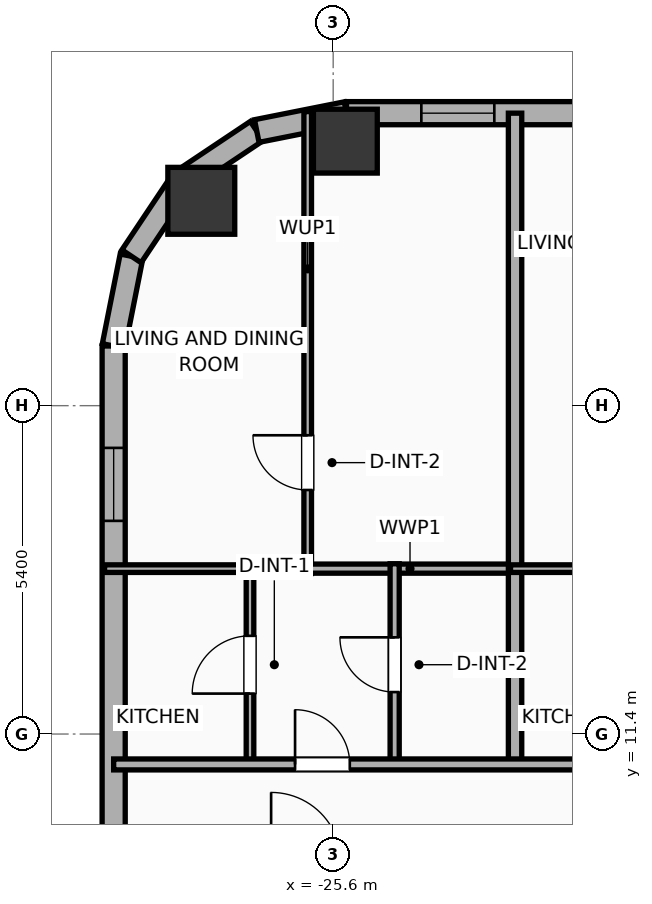
"""IFC4 building model, lengths in metres.
Left out: names, types, materials, properties, quantities, classifications, styles, units other than length and angle.
Written with IfcOpenShell. Run it as: python <this file> out.ifc"""

import sys

from ifc_helpers import new_model, si_unit, direction, frame, frame_2d, origin, origin_2d, place, context, subcontext, project, spatial, rectangle, hollow_rectangle, hollow_circle, extrude, element, fill, save


model = new_model("IFC4")
c1 = context("Model", 3, precision=1e-05, world=origin(), true_north=direction((0.0, 1.0)))
c2 = subcontext(c1, "Body", "Model", "MODEL_VIEW")
j1 = project(units=[si_unit("LENGTHUNIT", "METRE"), si_unit("PLANEANGLEUNIT", "RADIAN")], contexts=[c1])
p1 = place(None, origin())
s1 = spatial("IfcSite", under=j1, at=p1, CompositionType="ELEMENT")
p2 = place(p1, origin())
s2 = spatial("IfcBuilding", under=s1, at=p2, CompositionType="ELEMENT")
p3 = place(p2, frame((0.0, 0.0, 89.7)))
s3 = spatial("IfcBuildingStorey", under=s2, at=p3, CompositionType="ELEMENT", Elevation=89.7)
p4 = place(p3, frame((-25.4, 21.15, 0.0), z_axis=(0.0, 0.0, 1.0), x_axis=(1.0, 0.0, 0.0)))
e1 = element("IfcColumn", 1, at=p4, inside=s3, PredefinedType="COLUMN", context=c2, shape_type="SweptSolid", body=[
    extrude(hollow_rectangle(XDim=1.05, YDim=1.05, WallThickness=0.036, at=origin_2d()), origin(), (0.0, 0.0, 1.0), 3.9),
])
p5 = place(p3, frame((-27.769, 20.169, 0.0), z_axis=(0.0, 0.0, 1.0), x_axis=(1.0, 0.0, 0.0)))
e2 = element("IfcColumn", 2, at=p5, inside=s3, PredefinedType="COLUMN", context=c2, shape_type="SweptSolid", body=[
    extrude(hollow_circle(Radius=0.55, WallThickness=0.036, at=origin_2d()), origin(), (0.0, 0.0, 1.0), 3.9),
])
p6 = place(p3, frame((-29.21, -16.581, 0.0), z_axis=(0.0, 0.0, 1.0), x_axis=(0.0, 1.0, 0.0)))
e3 = element("IfcWall", 3, at=p6, inside=s3, PredefinedType="ELEMENTEDWALL", context=c2, shape_type="SweptSolid", body=[
    extrude(rectangle(XDim=34.363, YDim=0.38, at=frame_2d((17.181, 0.0))), origin(), (0.0, 0.0, 1.0), 2.54),
])
p7 = place(p6, frame((31.487, 0.0, 0.75)))
e4 = element("IfcOpeningElement", 4, at=p7, cuts=e3, PredefinedType="OPENING", context=c2, shape_type="SweptSolid", body=[
    extrude(rectangle(XDim=1.2, YDim=1.63, at=frame_2d((0.6, 0.815))), frame((0.0, 0.2, 0.0), z_axis=(0.0, -1.0, 0.0), x_axis=(1.0, 0.0, 0.0)), (0.0, 0.0, 1.0), 0.4),
])
p8 = place(p6, frame((20.726, 0.0, 0.75)))
e5 = element("IfcOpeningElement", 5, at=p8, cuts=e3, PredefinedType="OPENING", context=c2, shape_type="SweptSolid", body=[
    extrude(rectangle(XDim=1.2, YDim=1.63, at=frame_2d((0.6, 0.815))), frame((0.0, 0.2, 0.0), z_axis=(0.0, -1.0, 0.0), x_axis=(1.0, 0.0, 0.0)), (0.0, 0.0, 1.0), 0.4),
])
p9 = place(p6, frame((11.376, 0.0, 0.75)))
e6 = element("IfcOpeningElement", 6, at=p9, cuts=e3, PredefinedType="OPENING", context=c2, shape_type="SweptSolid", body=[
    extrude(rectangle(XDim=1.2, YDim=1.63, at=frame_2d((0.6, 0.815))), frame((0.0, 0.2, 0.0), z_axis=(0.0, -1.0, 0.0), x_axis=(1.0, 0.0, 0.0)), (0.0, 0.0, 1.0), 0.4),
])
p10 = place(p3, frame((-29.21, 17.781, 0.0), z_axis=(0.0, 0.0, 1.0), x_axis=(0.195086038585, 0.980786132421, 0.0)))
e7 = element("IfcWall", 7, at=p10, inside=s3, PredefinedType="ELEMENTEDWALL", context=c2, shape_type="SweptSolid", body=[
    extrude(rectangle(XDim=1.504, YDim=0.38, at=frame_2d((0.752, 0.0))), origin(), (0.0, 0.0, 1.0), 3.65),
])
p11 = place(p3, frame((-28.917, 19.257, 0.0), z_axis=(0.0, 0.0, 1.0), x_axis=(0.555610286119, 0.831442848281, 0.0)))
e8 = element("IfcWall", 8, at=p11, inside=s3, PredefinedType="ELEMENTEDWALL", context=c2, shape_type="SweptSolid", body=[
    extrude(rectangle(XDim=1.485, YDim=0.38, at=frame_2d((0.743, 0.0))), origin(), (0.0, 0.0, 1.0), 3.65),
])
p12 = place(p3, frame((-28.091, 20.491, 0.0), z_axis=(0.0, 0.0, 1.0), x_axis=(0.831468045563, 0.555572577804, 0.0)))
e9 = element("IfcWall", 9, at=p12, inside=s3, PredefinedType="ELEMENTEDWALL", context=c2, shape_type="SweptSolid", body=[
    extrude(rectangle(XDim=1.485, YDim=0.38, at=frame_2d((0.742, 0.0))), origin(), (0.0, 0.0, 1.0), 2.54),
])
p13 = place(p3, frame((-26.857, 21.316, 0.0), z_axis=(0.0, 0.0, 1.0), x_axis=(0.980755066645, 0.195242155415, 0.0)))
e10 = element("IfcWall", 10, at=p13, inside=s3, PredefinedType="ELEMENTEDWALL", context=c2, shape_type="SweptSolid", body=[
    extrude(rectangle(XDim=1.504, YDim=0.38, at=frame_2d((0.752, 0.0))), origin(), (0.0, 0.0, 1.0), 2.54),
])
p14 = place(p3, frame((-25.381, 21.61, 0.0), z_axis=(0.0, 0.0, 1.0), x_axis=(1.0, 0.0, 0.0)))
e11 = element("IfcWall", 11, at=p14, inside=s3, PredefinedType="ELEMENTEDWALL", context=c2, shape_type="SweptSolid", body=[
    extrude(rectangle(XDim=54.763, YDim=0.38, at=frame_2d((27.381, 0.0))), origin(), (0.0, 0.0, 1.0), 2.54),
])
p15 = place(p14, frame((6.495, 0.0, 0.75)))
e12 = element("IfcOpeningElement", 12, at=p15, cuts=e11, PredefinedType="OPENING", context=c2, shape_type="SweptSolid", body=[
    extrude(rectangle(XDim=2.4, YDim=1.63, at=frame_2d((1.2, 0.815))), frame((0.0, 0.2, 0.0), z_axis=(0.0, -1.0, 0.0), x_axis=(1.0, 0.0, 0.0)), (0.0, 0.0, 1.0), 0.4),
])
p16 = place(p14, frame((48.367, 0.0, 0.75)))
e13 = element("IfcOpeningElement", 13, at=p16, cuts=e11, PredefinedType="OPENING", context=c2, shape_type="SweptSolid", body=[
    extrude(rectangle(XDim=2.4, YDim=1.63, at=frame_2d((1.2, 0.815))), frame((0.0, 0.2, 0.0), z_axis=(0.0, -1.0, 0.0), x_axis=(1.0, 0.0, 0.0)), (0.0, 0.0, 1.0), 0.4),
])
p17 = place(p14, frame((1.231, 0.0, 0.75)))
e14 = element("IfcOpeningElement", 14, at=p17, cuts=e11, PredefinedType="OPENING", context=c2, shape_type="SweptSolid", body=[
    extrude(rectangle(XDim=1.2, YDim=1.63, at=frame_2d((0.6, 0.815))), frame((0.0, 0.2, 0.0), z_axis=(0.0, -1.0, 0.0), x_axis=(1.0, 0.0, 0.0)), (0.0, 0.0, 1.0), 0.4),
])
p18 = place(p14, frame((3.772, 0.0, 0.75)))
e15 = element("IfcOpeningElement", 15, at=p18, cuts=e11, PredefinedType="OPENING", context=c2, shape_type="SweptSolid", body=[
    extrude(rectangle(XDim=1.2, YDim=1.63, at=frame_2d((0.6, 0.815))), frame((0.0, 0.2, 0.0), z_axis=(0.0, -1.0, 0.0), x_axis=(1.0, 0.0, 0.0)), (0.0, 0.0, 1.0), 0.4),
])
p19 = place(p14, frame((12.031, 0.0, 0.75)))
e16 = element("IfcOpeningElement", 16, at=p19, cuts=e11, PredefinedType="OPENING", context=c2, shape_type="SweptSolid", body=[
    extrude(rectangle(XDim=1.2, YDim=1.63, at=frame_2d((0.6, 0.815))), frame((0.0, 0.2, 0.0), z_axis=(0.0, -1.0, 0.0), x_axis=(1.0, 0.0, 0.0)), (0.0, 0.0, 1.0), 0.4),
])
p20 = place(p14, frame((19.805, 0.0, 0.75)))
e17 = element("IfcOpeningElement", 17, at=p20, cuts=e11, PredefinedType="OPENING", context=c2, shape_type="SweptSolid", body=[
    extrude(rectangle(XDim=1.2, YDim=1.63, at=frame_2d((0.6, 0.815))), frame((0.0, 0.2, 0.0), z_axis=(0.0, -1.0, 0.0), x_axis=(1.0, 0.0, 0.0)), (0.0, 0.0, 1.0), 0.4),
])
p21 = place(p14, frame((16.555, 0.0, 0.75)))
e18 = element("IfcOpeningElement", 18, at=p21, cuts=e11, PredefinedType="OPENING", context=c2, shape_type="SweptSolid", body=[
    extrude(rectangle(XDim=1.2, YDim=1.63, at=frame_2d((0.6, 0.815))), frame((0.0, 0.2, 0.0), z_axis=(0.0, -1.0, 0.0), x_axis=(1.0, 0.0, 0.0)), (0.0, 0.0, 1.0), 0.4),
])
p22 = place(p14, frame((23.866, 0.0, 0.75)))
e19 = element("IfcOpeningElement", 19, at=p22, cuts=e11, PredefinedType="OPENING", context=c2, shape_type="SweptSolid", body=[
    extrude(rectangle(XDim=1.2, YDim=1.63, at=frame_2d((0.6, 0.815))), frame((0.0, 0.2, 0.0), z_axis=(0.0, -1.0, 0.0), x_axis=(1.0, 0.0, 0.0)), (0.0, 0.0, 1.0), 0.4),
])
p23 = place(p14, frame((27.116, 0.0, 0.75)))
e20 = element("IfcOpeningElement", 20, at=p23, cuts=e11, PredefinedType="OPENING", context=c2, shape_type="SweptSolid", body=[
    extrude(rectangle(XDim=1.2, YDim=1.63, at=frame_2d((0.6, 0.815))), frame((0.0, 0.2, 0.0), z_axis=(0.0, -1.0, 0.0), x_axis=(1.0, 0.0, 0.0)), (0.0, 0.0, 1.0), 0.4),
])
p24 = place(p14, frame((30.931, 0.0, 0.75)))
e21 = element("IfcOpeningElement", 21, at=p24, cuts=e11, PredefinedType="OPENING", context=c2, shape_type="SweptSolid", body=[
    extrude(rectangle(XDim=1.2, YDim=1.63, at=frame_2d((0.6, 0.815))), frame((0.0, 0.2, 0.0), z_axis=(0.0, -1.0, 0.0), x_axis=(1.0, 0.0, 0.0)), (0.0, 0.0, 1.0), 0.4),
])
p25 = place(p14, frame((36.733, 0.0, 0.75)))
e22 = element("IfcOpeningElement", 22, at=p25, cuts=e11, PredefinedType="OPENING", context=c2, shape_type="SweptSolid", body=[
    extrude(rectangle(XDim=1.2, YDim=1.63, at=frame_2d((0.6, 0.815))), frame((0.0, 0.2, 0.0), z_axis=(0.0, -1.0, 0.0), x_axis=(1.0, 0.0, 0.0)), (0.0, 0.0, 1.0), 0.4),
])
p26 = place(p14, frame((39.858, 0.0, 0.75)))
e23 = element("IfcOpeningElement", 23, at=p26, cuts=e11, PredefinedType="OPENING", context=c2, shape_type="SweptSolid", body=[
    extrude(rectangle(XDim=1.2, YDim=1.63, at=frame_2d((0.6, 0.815))), frame((0.0, 0.2, 0.0), z_axis=(0.0, -1.0, 0.0), x_axis=(1.0, 0.0, 0.0)), (0.0, 0.0, 1.0), 0.4),
])
p27 = place(p14, frame((44.636, 0.0, 0.75)))
e24 = element("IfcOpeningElement", 24, at=p27, cuts=e11, PredefinedType="OPENING", context=c2, shape_type="SweptSolid", body=[
    extrude(rectangle(XDim=1.2, YDim=1.63, at=frame_2d((0.6, 0.815))), frame((0.0, 0.2, 0.0), z_axis=(0.0, -1.0, 0.0), x_axis=(1.0, 0.0, 0.0)), (0.0, 0.0, 1.0), 0.4),
])
p28 = place(p14, frame((51.809, 0.0, 0.75)))
e25 = element("IfcOpeningElement", 25, at=p28, cuts=e11, PredefinedType="OPENING", context=c2, shape_type="SweptSolid", body=[
    extrude(rectangle(XDim=1.2, YDim=1.63, at=frame_2d((0.6, 0.815))), frame((0.0, 0.2, 0.0), z_axis=(0.0, -1.0, 0.0), x_axis=(1.0, 0.0, 0.0)), (0.0, 0.0, 1.0), 0.4),
])
p29 = place(p3, frame((-26.019, 14.04, 0.0), z_axis=(0.0, 0.0, 1.0), x_axis=(0.0, 1.0, 0.0)))
e26 = element("IfcWall", 26, at=p29, inside=s3, PredefinedType="PARTITIONING", context=c2, shape_type="SweptSolid", body=[
    extrude(rectangle(XDim=7.596, YDim=0.125, at=frame_2d((3.798, 0.0))), origin(), (0.0, 0.0, 1.0), 3.65),
])
p30 = place(p29, frame((1.373, 0.0, 0.0)))
e27 = element("IfcOpeningElement", 27, at=p30, cuts=e26, PredefinedType="OPENING", context=c2, shape_type="SweptSolid", body=[
    extrude(rectangle(XDim=0.9, YDim=2.05, at=frame_2d((0.45, 1.025))), frame((0.0, 0.073, 0.0), z_axis=(0.0, -1.0, 0.0), x_axis=(1.0, 0.0, 0.0)), (0.0, 0.0, 1.0), 0.145),
])
p31 = place(p3, frame((-26.139, 14.12, 0.0), z_axis=(0.0, 0.0, 1.0), x_axis=(1.0, 0.0, 0.0)))
e28 = element("IfcWall", 28, at=p31, inside=s3, PredefinedType="PLUMBINGWALL", context=c2, shape_type="SweptSolid", body=[
    extrude(rectangle(XDim=3.605, YDim=0.15, at=frame_2d((1.802, 0.0))), origin(), (0.0, 0.0, 1.0), 3.65),
])
p32 = place(p3, frame((-26.968, 10.88, 0.0), z_axis=(0.0, 0.0, 1.0), x_axis=(0.0, 1.0, 0.0)))
e29 = element("IfcWall", 29, at=p32, inside=s3, PredefinedType="PARTITIONING", context=c2, shape_type="SweptSolid", body=[
    extrude(rectangle(XDim=3.32, YDim=0.125, at=frame_2d((1.66, 0.0))), origin(), (0.0, 0.0, 1.0), 3.65),
])
p33 = place(p32, frame((1.185, 0.0, 0.0)))
e30 = element("IfcOpeningElement", 30, at=p33, cuts=e29, PredefinedType="OPENING", context=c2, shape_type="SweptSolid", body=[
    extrude(rectangle(XDim=0.95, YDim=2.05, at=frame_2d((0.475, 1.025))), frame((0.0, 0.073, 0.0), z_axis=(0.0, -1.0, 0.0), x_axis=(1.0, 0.0, 0.0)), (0.0, 0.0, 1.0), 0.145),
])
p34 = place(p3, frame((-29.36, 14.12, 0.0), z_axis=(0.0, 0.0, 1.0), x_axis=(1.0, 0.0, 0.0)))
e31 = element("IfcWall", 31, at=p34, inside=s3, PredefinedType="PARTITIONING", context=c2, shape_type="SweptSolid", body=[
    extrude(rectangle(XDim=2.512, YDim=0.125, at=frame_2d((1.256, 0.0))), origin(), (0.0, 0.0, 1.0), 3.65),
])
p35 = place(p3, frame((-24.589, 10.88, 0.0), z_axis=(0.0, 0.0, 1.0), x_axis=(0.0, 1.0, 0.0)))
e32 = element("IfcWall", 32, at=p35, inside=s3, PredefinedType="PLUMBINGWALL", context=c2, shape_type="SweptSolid", body=[
    extrude(rectangle(XDim=3.32, YDim=0.15, at=frame_2d((1.66, 0.0))), origin(), (0.0, 0.0, 1.0), 3.65),
])
p36 = place(p35, frame((1.21, 0.0, 0.0)))
e33 = element("IfcOpeningElement", 33, at=p36, cuts=e32, PredefinedType="OPENING", context=c2, shape_type="SweptSolid", body=[
    extrude(rectangle(XDim=0.9, YDim=2.05, at=frame_2d((0.45, 1.025))), frame((0.0, 0.085, 0.0), z_axis=(0.0, -1.0, 0.0), x_axis=(1.0, 0.0, 0.0)), (0.0, 0.0, 1.0), 0.17),
])
p37 = place(p3, frame((-22.609, 10.82, 0.0), z_axis=(0.0, 0.0, 1.0), x_axis=(0.0, 1.0, 0.0)))
e34 = element("IfcWall", 34, at=p37, inside=s3, PredefinedType="PARTITIONING", context=c2, shape_type="SweptSolid", body=[
    extrude(rectangle(XDim=10.79, YDim=0.22, at=frame_2d((5.395, 0.0))), origin(), (0.0, 0.0, 1.0), 3.65),
])
p38 = place(p3, frame((-22.684, 14.12, 0.0), z_axis=(0.0, 0.0, 1.0), x_axis=(1.0, 0.0, 0.0)))
e35 = element("IfcWall", 35, at=p38, inside=s3, PredefinedType="PARTITIONING", context=c2, shape_type="SweptSolid", body=[
    extrude(rectangle(XDim=2.505, YDim=0.125, at=frame_2d((1.252, 0.0))), origin(), (0.0, 0.0, 1.0), 3.65),
])
p39 = place(p3, frame((-29.21, 10.9, 0.0), z_axis=(0.0, 0.0, 1.0), x_axis=(1.0, 0.0, 0.0)))
e36 = element("IfcWall", 36, at=p39, inside=s3, PredefinedType="PARTITIONING", context=c2, shape_type="SweptSolid", body=[
    extrude(rectangle(XDim=62.42, YDim=0.18, at=frame_2d((31.21, 0.0))), origin(), (0.0, 0.0, 1.0), 3.65),
])
p40 = place(p39, frame((2.983, 0.0, 0.0)))
e37 = element("IfcOpeningElement", 37, at=p40, cuts=e36, PredefinedType="OPENING", context=c2, shape_type="SweptSolid", body=[
    extrude(rectangle(XDim=0.9, YDim=2.05, at=frame_2d((0.45, 1.025))), frame((0.0, 0.1, 0.0), z_axis=(0.0, -1.0, 0.0), x_axis=(1.0, 0.0, 0.0)), (0.0, 0.0, 1.0), 0.2),
])
p41 = place(p39, frame((9.618, 0.0, 0.0)))
e38 = element("IfcOpeningElement", 38, at=p41, cuts=e36, PredefinedType="OPENING", context=c2, shape_type="SweptSolid", body=[
    extrude(rectangle(XDim=0.9, YDim=2.05, at=frame_2d((0.45, 1.025))), frame((0.0, 0.1, 0.0), z_axis=(0.0, -1.0, 0.0), x_axis=(1.0, 0.0, 0.0)), (0.0, 0.0, 1.0), 0.2),
])
p42 = place(p39, frame((16.135, 0.0, 0.0)))
e39 = element("IfcOpeningElement", 39, at=p42, cuts=e36, PredefinedType="OPENING", context=c2, shape_type="SweptSolid", body=[
    extrude(rectangle(XDim=0.9, YDim=2.05, at=frame_2d((0.45, 1.025))), frame((0.0, 0.1, 0.0), z_axis=(0.0, -1.0, 0.0), x_axis=(1.0, 0.0, 0.0)), (0.0, 0.0, 1.0), 0.2),
])
p43 = place(p39, frame((23.632, 0.0, 0.0)))
e40 = element("IfcOpeningElement", 40, at=p43, cuts=e36, PredefinedType="OPENING", context=c2, shape_type="SweptSolid", body=[
    extrude(rectangle(XDim=1.15, YDim=2.05, at=frame_2d((0.575, 1.025))), frame((0.0, 0.1, 0.0), z_axis=(0.0, -1.0, 0.0), x_axis=(1.0, 0.0, 0.0)), (0.0, 0.0, 1.0), 0.2),
])
p44 = place(p39, frame((27.751, 0.0, 0.0)))
e41 = element("IfcOpeningElement", 41, at=p44, cuts=e36, PredefinedType="OPENING", context=c2, shape_type="SweptSolid", body=[
    extrude(rectangle(XDim=1.15, YDim=2.05, at=frame_2d((0.575, 1.025))), frame((0.0, 0.1, 0.0), z_axis=(0.0, -1.0, 0.0), x_axis=(1.0, 0.0, 0.0)), (0.0, 0.0, 1.0), 0.2),
])
p45 = place(p39, frame((35.635, 0.0, 0.0)))
e42 = element("IfcOpeningElement", 42, at=p45, cuts=e36, PredefinedType="OPENING", context=c2, shape_type="SweptSolid", body=[
    extrude(rectangle(XDim=0.9, YDim=2.05, at=frame_2d((0.45, 1.025))), frame((0.0, 0.1, 0.0), z_axis=(0.0, -1.0, 0.0), x_axis=(1.0, 0.0, 0.0)), (0.0, 0.0, 1.0), 0.2),
])
p46 = place(p39, frame((40.616, 0.0, 0.0)))
e43 = element("IfcOpeningElement", 43, at=p46, cuts=e36, PredefinedType="OPENING", context=c2, shape_type="SweptSolid", body=[
    extrude(rectangle(XDim=1.15, YDim=2.05, at=frame_2d((0.575, 1.025))), frame((0.0, 0.1, 0.0), z_axis=(0.0, -1.0, 0.0), x_axis=(1.0, 0.0, 0.0)), (0.0, 0.0, 1.0), 0.2),
])
p47 = place(p39, frame((48.256, 0.0, 0.0)))
e44 = element("IfcOpeningElement", 44, at=p47, cuts=e36, PredefinedType="OPENING", context=c2, shape_type="SweptSolid", body=[
    extrude(rectangle(XDim=0.9, YDim=2.05, at=frame_2d((0.45, 1.025))), frame((0.0, 0.1, 0.0), z_axis=(0.0, -1.0, 0.0), x_axis=(1.0, 0.0, 0.0)), (0.0, 0.0, 1.0), 0.2),
])
p48 = place(p39, frame((57.032, 0.0, 0.0)))
e45 = element("IfcOpeningElement", 45, at=p48, cuts=e36, PredefinedType="OPENING", context=c2, shape_type="SweptSolid", body=[
    extrude(rectangle(XDim=1.15, YDim=2.05, at=frame_2d((0.575, 1.025))), frame((0.0, 0.1, 0.0), z_axis=(0.0, -1.0, 0.0), x_axis=(1.0, 0.0, 0.0)), (0.0, 0.0, 1.0), 0.2),
])
p49 = place(p7, origin())
e46 = element("IfcWindow", 46, at=p49, inside=s3, PartitioningType="SINGLE_PANEL", PredefinedType="WINDOW", context=c2, shape_type="SweptSolid", body=[
    extrude(rectangle(XDim=1.2, YDim=1.63, at=frame_2d((0.6, 0.815))), frame((0.0, 0.03, 0.0), z_axis=(0.0, -1.0, 0.0), x_axis=(1.0, 0.0, 0.0)), (0.0, 0.0, 1.0), 0.06),
])
fill(e4, e46)
p50 = place(p17, origin())
e47 = element("IfcWindow", 47, at=p50, inside=s3, PartitioningType="SINGLE_PANEL", PredefinedType="WINDOW", context=c2, shape_type="SweptSolid", body=[
    extrude(rectangle(XDim=1.2, YDim=1.63, at=frame_2d((0.6, 0.815))), frame((0.0, 0.03, 0.0), z_axis=(0.0, -1.0, 0.0), x_axis=(1.0, 0.0, 0.0)), (0.0, 0.0, 1.0), 0.06),
])
fill(e14, e47)
p51 = place(p30, origin())
e48 = element("IfcDoor", 48, at=p51, inside=s3, OperationType="SINGLE_SWING_RIGHT", PredefinedType="DOOR", context=c2, shape_type="SweptSolid", body=[
    extrude(rectangle(XDim=0.9, YDim=2.05, at=frame_2d((0.45, 1.025))), frame((0.0, 0.025, 0.0), z_axis=(0.0, -1.0, 0.0), x_axis=(1.0, 0.0, 0.0)), (0.0, 0.0, 1.0), 0.05),
])
fill(e27, e48)
p52 = place(p33, origin())
e49 = element("IfcDoor", 49, at=p52, inside=s3, OperationType="SINGLE_SWING_LEFT", PredefinedType="DOOR", context=c2, shape_type="SweptSolid", body=[
    extrude(rectangle(XDim=0.95, YDim=2.05, at=frame_2d((0.475, 1.025))), frame((0.0, 0.025, 0.0), z_axis=(0.0, -1.0, 0.0), x_axis=(1.0, 0.0, 0.0)), (0.0, 0.0, 1.0), 0.05),
])
fill(e30, e49)
p53 = place(p36, origin())
e50 = element("IfcDoor", 50, at=p53, inside=s3, OperationType="SINGLE_SWING_RIGHT", PredefinedType="DOOR", context=c2, shape_type="SweptSolid", body=[
    extrude(rectangle(XDim=0.9, YDim=2.05, at=frame_2d((0.45, 1.025))), frame((0.0, 0.025, 0.0), z_axis=(0.0, -1.0, 0.0), x_axis=(1.0, 0.0, 0.0)), (0.0, 0.0, 1.0), 0.05),
])
fill(e33, e50)
p54 = place(p40, origin())
e51 = element("IfcDoor", 51, at=p54, inside=s3, OperationType="SINGLE_SWING_LEFT", PredefinedType="DOOR", context=c2, shape_type="SweptSolid", body=[
    extrude(rectangle(XDim=0.9, YDim=2.05, at=frame_2d((0.45, 1.025))), frame((0.0, 0.025, 0.0), z_axis=(0.0, -1.0, 0.0), x_axis=(1.0, 0.0, 0.0)), (0.0, 0.0, 1.0), 0.05),
])
fill(e37, e51)
save(model, sys.argv[1])
